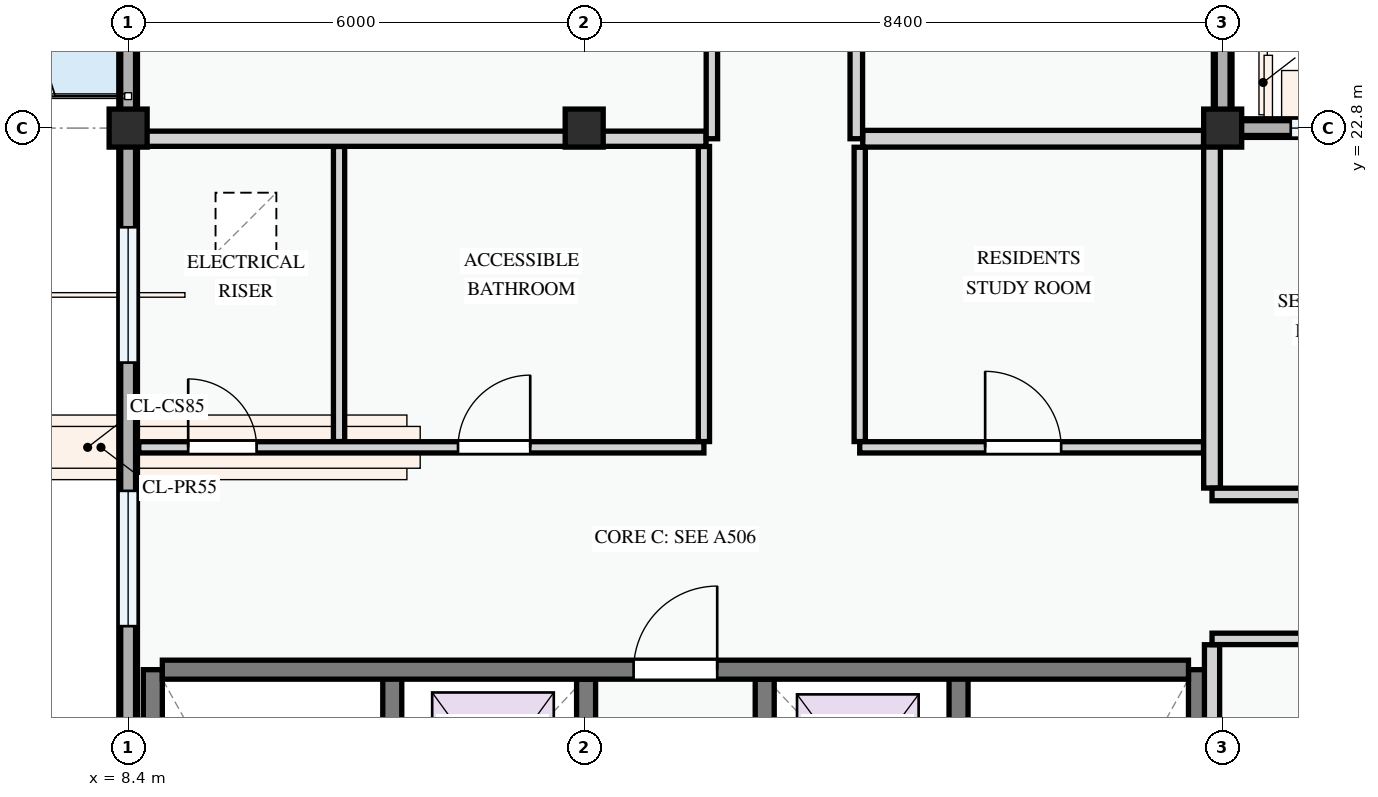
"""IFC4 building model, lengths in metres.
Left out: names, types, materials, properties, quantities, classifications, styles, units other than length and angle.
Written with IfcOpenShell. Run it as: python <this file> out.ifc"""

import sys

from ifc_helpers import new_model, si_unit, direction, frame, frame_2d, origin, origin_2d, place, context, subcontext, project, spatial, polyline, rectangle, outline, extrude, element, fill, save


model = new_model("IFC4")
c1 = context("Model", 3, precision=1e-05, world=origin(), true_north=direction((0.0, 1.0)))
c2 = subcontext(c1, "Body", "Model", "MODEL_VIEW")
j1 = project(units=[si_unit("LENGTHUNIT", "METRE"), si_unit("PLANEANGLEUNIT", "RADIAN")], contexts=[c1])
p1 = place(None, origin())
s1 = spatial("IfcSite", under=j1, at=p1, CompositionType="ELEMENT")
p2 = place(p1, origin())
s2 = spatial("IfcBuilding", under=s1, at=p2, CompositionType="ELEMENT")
p3 = place(p2, frame((0.0, 0.0, 34.5)))
s3 = spatial("IfcBuildingStorey", under=s2, at=p3, CompositionType="ELEMENT", Elevation=34.5)
for number, where, z_axis, x_axis in (
    (1, (8.4, 22.8, 0.0), (0.0, 0.0, 1.0), (1.0, 0.0, 0.0)),
    (2, (14.4, 22.8, 0.0), (0.0, 0.0, 1.0), (1.0, 0.0, 0.0)),
    (3, (22.8, 22.8, 0.0), (0.0, 0.0, 1.0), (1.0, 0.0, 0.0)),
):
    element("IfcColumn", number, at=place(p3, frame(where, z_axis=z_axis, x_axis=x_axis)), inside=s3, PredefinedType="COLUMN", context=c2, shape_type="SweptSolid", body=[
        extrude(rectangle(XDim=0.5, YDim=0.5, at=origin_2d()), origin(), (0.0, 0.0, 1.0), 3.3),
    ])
p4 = place(p3, frame((22.8, 22.8, 0.0), z_axis=(0.0, 0.0, 1.0), x_axis=(0.0, 1.0, 0.0)))
e4 = element("IfcWall", 4, at=p4, inside=s3, PredefinedType="STANDARD", context=c2, shape_type="SweptSolid", body=[
    extrude(rectangle(XDim=6.0, YDim=0.245, at=frame_2d((3.0, 0.0))), origin(), (0.0, 0.0, 1.0), 2.575),
])
p5 = place(p4, frame((1.285, 0.0, 0.78)))
e5 = element("IfcOpeningElement", 5, at=p5, cuts=e4, PredefinedType="OPENING", context=c2, shape_type="SweptSolid", body=[
    extrude(rectangle(XDim=1.3, YDim=1.4, at=frame_2d((0.65, 0.7))), frame((0.0, 0.133, 0.0), z_axis=(0.0, -1.0, 0.0), x_axis=(1.0, 0.0, 0.0)), (0.0, 0.0, 1.0), 0.265),
])
p6 = place(p4, frame((4.271, 0.0, 0.78)))
e6 = element("IfcOpeningElement", 6, at=p6, cuts=e4, PredefinedType="OPENING", context=c2, shape_type="SweptSolid", body=[
    extrude(rectangle(XDim=0.95, YDim=1.15, at=frame_2d((0.475, 0.575))), frame((0.0, 0.133, 0.0), z_axis=(0.0, -1.0, 0.0), x_axis=(1.0, 0.0, 0.0)), (0.0, 0.0, 1.0), 0.265),
])
p7 = place(p3, frame((8.4, 28.8, 0.0), z_axis=(0.0, 0.0, 1.0), x_axis=(0.0, -1.0, 0.0)))
e7 = element("IfcWall", 7, at=p7, inside=s3, PredefinedType="STANDARD", context=c2, shape_type="SweptSolid", body=[
    extrude(rectangle(XDim=6.0, YDim=0.245, at=frame_2d((3.0, 0.0))), origin(), (0.0, 0.0, 1.0), 2.445),
])
p8 = place(p7, frame((3.135, 0.0, 0.0)))
e8 = element("IfcOpeningElement", 8, at=p8, cuts=e7, PredefinedType="OPENING", context=c2, shape_type="SweptSolid", body=[
    extrude(rectangle(XDim=1.6, YDim=2.2, at=frame_2d((0.8, 1.1))), frame((0.0, 0.133, 0.0), z_axis=(0.0, -1.0, 0.0), x_axis=(1.0, 0.0, 0.0)), (0.0, 0.0, 1.0), 0.265),
])
p9 = place(p7, frame((0.7, 0.0, 0.78)))
e9 = element("IfcOpeningElement", 9, at=p9, cuts=e7, PredefinedType="OPENING", context=c2, shape_type="SweptSolid", body=[
    extrude(rectangle(XDim=0.95, YDim=1.15, at=frame_2d((0.475, 0.575))), frame((0.0, 0.133, 0.0), z_axis=(0.0, -1.0, 0.0), x_axis=(1.0, 0.0, 0.0)), (0.0, 0.0, 1.0), 0.265),
])
p10 = place(p3, frame((8.4, 22.8, 0.0), z_axis=(0.0, 0.0, 1.0), x_axis=(0.0, -1.0, 0.0)))
e10 = element("IfcWall", 10, at=p10, inside=s3, PredefinedType="STANDARD", context=c2, shape_type="SweptSolid", body=[
    extrude(rectangle(XDim=8.4, YDim=0.245, at=frame_2d((4.2, 0.0))), origin(), (0.0, 0.0, 1.0), 2.345),
])
p11 = place(p10, frame((1.305, 0.0, 0.78)))
e11 = element("IfcOpeningElement", 11, at=p11, cuts=e10, PredefinedType="OPENING", context=c2, shape_type="SweptSolid", body=[
    extrude(rectangle(XDim=1.78, YDim=1.42, at=frame_2d((0.89, 0.71))), frame((0.0, 0.133, 0.0), z_axis=(0.0, -1.0, 0.0), x_axis=(1.0, 0.0, 0.0)), (0.0, 0.0, 1.0), 0.265),
])
p12 = place(p10, frame((4.772, 0.0, 0.78)))
e12 = element("IfcOpeningElement", 12, at=p12, cuts=e10, PredefinedType="OPENING", context=c2, shape_type="SweptSolid", body=[
    extrude(rectangle(XDim=1.78, YDim=1.42, at=frame_2d((0.89, 0.71))), frame((0.0, 0.133, 0.0), z_axis=(0.0, -1.0, 0.0), x_axis=(1.0, 0.0, 0.0)), (0.0, 0.0, 1.0), 0.265),
])
p13 = place(p3, frame((28.8, 22.8, 0.0), z_axis=(0.0, 0.0, 1.0), x_axis=(-1.0, 0.0, 0.0)))
e13 = element("IfcWall", 13, at=p13, inside=s3, PredefinedType="STANDARD", context=c2, shape_type="SweptSolid", body=[
    extrude(rectangle(XDim=6.0, YDim=0.245, at=frame_2d((3.0, 0.0))), origin(), (0.0, 0.0, 1.0), 2.525),
])
p14 = place(p13, frame((0.729, 0.0, 0.78)))
e14 = element("IfcOpeningElement", 14, at=p14, cuts=e13, PredefinedType="OPENING", context=c2, shape_type="SweptSolid", body=[
    extrude(rectangle(XDim=1.05, YDim=1.2, at=frame_2d((0.525, 0.6))), frame((0.0, 0.133, 0.0), z_axis=(0.0, -1.0, 0.0), x_axis=(1.0, 0.0, 0.0)), (0.0, 0.0, 1.0), 0.265),
])
p15 = place(p13, frame((3.025, 0.0, 0.78)))
e15 = element("IfcOpeningElement", 15, at=p15, cuts=e13, PredefinedType="OPENING", context=c2, shape_type="SweptSolid", body=[
    extrude(rectangle(XDim=2.08, YDim=1.52, at=frame_2d((1.04, 0.76))), frame((0.0, 0.133, 0.0), z_axis=(0.0, -1.0, 0.0), x_axis=(1.0, 0.0, 0.0)), (0.0, 0.0, 1.0), 0.265),
])
p16 = place(p3, frame((22.8, 22.8, 3.3), z_axis=(0.0, 0.0, 1.0), x_axis=(0.0, 1.0, 0.0)))
e16 = element("IfcWall", 16, at=p16, inside=s3, PredefinedType="PARAPET", context=c2, shape_type="SweptSolid", body=[
    extrude(rectangle(XDim=20.4, YDim=0.195, at=frame_2d((10.2, 0.0))), origin(), (0.0, 0.0, 1.0), 1.15),
])
p17 = place(p3, frame((8.4, 28.8, 3.3), z_axis=(0.0, 0.0, 1.0), x_axis=(0.0, -1.0, 0.0)))
e17 = element("IfcWall", 17, at=p17, inside=s3, PredefinedType="PARAPET", context=c2, shape_type="SweptSolid", body=[
    extrude(outline(polyline([(0.0, 0.0), (6.0, 0.0), (6.0, 1.12), (5.5, 1.322), (5.0, 1.484), (4.5, 1.618), (4.0, 1.717), (3.5, 1.779), (3.0, 1.8), (2.5, 1.779), (2.0, 1.717), (1.5, 1.618), (1.0, 1.484), (0.5, 1.322), (0.0, 1.12), (0.0, 0.0)])), frame((0.0, 0.098, 0.0), z_axis=(0.0, -1.0, 0.0), x_axis=(1.0, 0.0, 0.0)), (0.0, 0.0, 1.0), 0.195),
])
p18 = place(p3, frame((8.4, 22.8, 3.3), z_axis=(0.0, 0.0, 1.0), x_axis=(0.0, -1.0, 0.0)))
e18 = element("IfcWall", 18, at=p18, inside=s3, PredefinedType="PARAPET", context=c2, shape_type="SweptSolid", body=[
    extrude(outline(polyline([(0.0, 0.0), (8.4, 0.0), (8.4, 1.12), (7.7, 1.322), (7.0, 1.484), (6.3, 1.618), (5.6, 1.717), (4.9, 1.779), (4.2, 1.8), (3.5, 1.779), (2.8, 1.717), (2.1, 1.618), (1.4, 1.484), (0.7, 1.322), (0.0, 1.12), (0.0, 0.0)])), frame((0.0, 0.098, 0.0), z_axis=(0.0, -1.0, 0.0), x_axis=(1.0, 0.0, 0.0)), (0.0, 0.0, 1.0), 0.195),
])
p19 = place(p3, frame((43.2, 22.8, 3.3), z_axis=(0.0, 0.0, 1.0), x_axis=(-1.0, 0.0, 0.0)))
e19 = element("IfcWall", 19, at=p19, inside=s3, PredefinedType="PARAPET", context=c2, shape_type="SweptSolid", body=[
    extrude(rectangle(XDim=20.4, YDim=0.195, at=frame_2d((10.2, 0.0))), origin(), (0.0, 0.0, 1.0), 1.15),
])
p20 = place(p3, frame((11.875, 8.75, 0.0), z_axis=(0.0, 0.0, 1.0), x_axis=(0.0, 1.0, 0.0)))
e20 = element("IfcWall", 20, at=p20, inside=s3, PredefinedType="SHEAR", context=c2, shape_type="SweptSolid", body=[
    extrude(rectangle(XDim=6.925, YDim=0.25, at=frame_2d((3.462, 0.0))), origin(), (0.0, 0.0, 1.0), 3.0),
])
p21 = place(p20, frame((0.35, 0.0, 0.0)))
e21 = element("IfcOpeningElement", 21, at=p21, cuts=e20, PredefinedType="OPENING", context=c2, shape_type="SweptSolid", body=[
    extrude(rectangle(XDim=0.95, YDim=2.1, at=frame_2d((0.475, 1.05))), frame((0.0, 0.135, 0.0), z_axis=(0.0, -1.0, 0.0), x_axis=(1.0, 0.0, 0.0)), (0.0, 0.0, 1.0), 0.27),
])
p22 = place(p3, frame((8.725, 8.6, 0.0), z_axis=(0.0, 0.0, 1.0), x_axis=(0.0, 1.0, 0.0)))
e22 = element("IfcWall", 22, at=p22, inside=s3, PredefinedType="SHEAR", context=c2, shape_type="SweptSolid", body=[
    extrude(rectangle(XDim=7.075, YDim=0.25, at=frame_2d((3.538, 0.0))), origin(), (0.0, 0.0, 1.0), 3.0),
])
p23 = place(p3, frame((22.475, 8.75, 0.0), z_axis=(0.0, 0.0, 1.0), x_axis=(0.0, 1.0, 0.0)))
e23 = element("IfcWall", 23, at=p23, inside=s3, PredefinedType="SHEAR", context=c2, shape_type="SweptSolid", body=[
    extrude(rectangle(XDim=6.925, YDim=0.25, at=frame_2d((3.462, 0.0))), origin(), (0.0, 0.0, 1.0), 3.0),
])
p24 = place(p3, frame((19.325, 8.75, 0.0), z_axis=(0.0, 0.0, 1.0), x_axis=(0.0, 1.0, 0.0)))
e24 = element("IfcWall", 24, at=p24, inside=s3, PredefinedType="SHEAR", context=c2, shape_type="SweptSolid", body=[
    extrude(rectangle(XDim=6.925, YDim=0.25, at=frame_2d((3.462, 0.0))), origin(), (0.0, 0.0, 1.0), 3.0),
])
p25 = place(p24, frame((0.35, 0.0, 0.0)))
e25 = element("IfcOpeningElement", 25, at=p25, cuts=e24, PredefinedType="OPENING", context=c2, shape_type="SweptSolid", body=[
    extrude(rectangle(XDim=0.95, YDim=2.1, at=frame_2d((0.475, 1.05))), frame((0.0, 0.135, 0.0), z_axis=(0.0, -1.0, 0.0), x_axis=(1.0, 0.0, 0.0)), (0.0, 0.0, 1.0), 0.27),
])
for number, where, z_axis, x_axis in (
    (26, (14.425, 13.125, 0.0), (0.0, 0.0, 1.0), (0.0, 1.0, 0.0)),
    (27, (16.775, 13.125, 0.0), (0.0, 0.0, 1.0), (0.0, 1.0, 0.0)),
):
    element("IfcWall", number, at=place(p3, frame(where, z_axis=z_axis, x_axis=x_axis)), inside=s3, PredefinedType="SHEAR", context=c2, shape_type="SweptSolid", body=[
        extrude(rectangle(XDim=2.425, YDim=0.25, at=frame_2d((1.212, 0.0))), origin(), (0.0, 0.0, 1.0), 3.0),
    ])
p26 = place(p3, frame((8.85, 15.675, 0.0), z_axis=(0.0, 0.0, 1.0), x_axis=(1.0, 0.0, 0.0)))
e28 = element("IfcWall", 28, at=p26, inside=s3, PredefinedType="SHEAR", context=c2, shape_type="SweptSolid", body=[
    extrude(rectangle(XDim=13.5, YDim=0.25, at=frame_2d((6.75, 0.0))), origin(), (0.0, 0.0, 1.0), 3.0),
])
p27 = place(p26, frame((6.2, 0.0, 0.0)))
e29 = element("IfcOpeningElement", 29, at=p27, cuts=e28, PredefinedType="OPENING", context=c2, shape_type="SweptSolid", body=[
    extrude(rectangle(XDim=1.1, YDim=2.15, at=frame_2d((0.55, 1.075))), frame((0.0, 0.135, 0.0), z_axis=(0.0, -1.0, 0.0), x_axis=(1.0, 0.0, 0.0)), (0.0, 0.0, 1.0), 0.27),
])
for number, where, z_axis, x_axis in (
    (30, (11.175, 18.676, 0.0), (0.0, 0.0, 1.0), (0.0, 1.0, 0.0)),
    (31, (15.975, 18.676, 0.0), (0.0, 0.0, 1.0), (0.0, 1.0, 0.0)),
):
    element("IfcWall", number, at=place(p3, frame(where, z_axis=z_axis, x_axis=x_axis)), inside=s3, PredefinedType="PARTITIONING", context=c2, shape_type="SweptSolid", body=[
        extrude(rectangle(XDim=3.882, YDim=0.148, at=frame_2d((1.941, 0.0))), origin(), (0.0, 0.0, 1.0), 3.0),
    ])
p28 = place(p3, frame((18.025, 18.676, 0.0), z_axis=(0.0, 0.0, 1.0), x_axis=(0.0, 1.0, 0.0)))
e32 = element("IfcWall", 32, at=p28, inside=s3, PredefinedType="PARTITIONING", context=c2, shape_type="SweptSolid", body=[
    extrude(rectangle(XDim=3.872, YDim=0.148, at=frame_2d((1.936, 0.0))), origin(), (0.0, 0.0, 1.0), 3.0),
])
p29 = place(p3, frame((8.54, 18.6, 0.0), z_axis=(0.0, 0.0, 1.0), x_axis=(1.0, 0.0, 0.0)))
e33 = element("IfcWall", 33, at=p29, inside=s3, PredefinedType="PARTITIONING", context=c2, shape_type="SweptSolid", body=[
    extrude(rectangle(XDim=7.435, YDim=0.148, at=frame_2d((3.718, 0.0))), origin(), (0.0, 0.0, 1.0), 3.0),
])
p30 = place(p29, frame((0.65, 0.0, 0.0)))
e34 = element("IfcOpeningElement", 34, at=p30, cuts=e33, PredefinedType="OPENING", context=c2, shape_type="SweptSolid", body=[
    extrude(rectangle(XDim=0.9, YDim=2.1, at=frame_2d((0.45, 1.05))), frame((0.0, 0.084, 0.0), z_axis=(0.0, -1.0, 0.0), x_axis=(1.0, 0.0, 0.0)), (0.0, 0.0, 1.0), 0.168),
])
p31 = place(p29, frame((4.2, 0.0, 0.0)))
e35 = element("IfcOpeningElement", 35, at=p31, cuts=e33, PredefinedType="OPENING", context=c2, shape_type="SweptSolid", body=[
    extrude(rectangle(XDim=0.95, YDim=2.1, at=frame_2d((0.475, 1.05))), frame((0.0, 0.084, 0.0), z_axis=(0.0, -1.0, 0.0), x_axis=(1.0, 0.0, 0.0)), (0.0, 0.0, 1.0), 0.168),
])
p32 = place(p3, frame((18.025, 18.6, 0.0), z_axis=(0.0, 0.0, 1.0), x_axis=(1.0, 0.0, 0.0)))
e36 = element("IfcWall", 36, at=p32, inside=s3, PredefinedType="PARTITIONING", context=c2, shape_type="SweptSolid", body=[
    extrude(rectangle(XDim=4.523, YDim=0.148, at=frame_2d((2.262, 0.0))), origin(), (0.0, 0.0, 1.0), 3.0),
])
p33 = place(p32, frame((1.65, 0.0, 0.0)))
e37 = element("IfcOpeningElement", 37, at=p33, cuts=e36, PredefinedType="OPENING", context=c2, shape_type="SweptSolid", body=[
    extrude(rectangle(XDim=1.0, YDim=2.15, at=frame_2d((0.5, 1.075))), frame((0.0, 0.084, 0.0), z_axis=(0.0, -1.0, 0.0), x_axis=(1.0, 0.0, 0.0)), (0.0, 0.0, 1.0), 0.168),
])
p34 = place(p3, frame((8.524, 22.66, 0.0), z_axis=(0.0, 0.0, 1.0), x_axis=(1.0, 0.0, 0.0)))
e38 = element("IfcWall", 38, at=p34, inside=s3, PredefinedType="PARTITIONING", context=c2, shape_type="SweptSolid", body=[
    extrude(rectangle(XDim=7.479, YDim=0.2, at=frame_2d((3.739, 0.0))), origin(), (0.0, 0.0, 1.0), 2.375),
])
p35 = place(p3, frame((18.064, 22.66, 0.0), z_axis=(0.0, 0.0, 1.0), x_axis=(1.0, 0.0, 0.0)))
e39 = element("IfcWall", 39, at=p35, inside=s3, PredefinedType="PARTITIONING", context=c2, shape_type="SweptSolid", body=[
    extrude(rectangle(XDim=4.484, YDim=0.22, at=frame_2d((2.242, 0.0))), origin(), (0.0, 0.0, 1.0), 2.375),
])
p36 = place(p3, frame((16.08, 22.66, 0.0), z_axis=(0.0, 0.0, 1.0), x_axis=(0.0, 1.0, 0.0)))
e40 = element("IfcWall", 40, at=p36, inside=s3, PredefinedType="PARTITIONING", context=c2, shape_type="SweptSolid", body=[
    extrude(rectangle(XDim=20.416, YDim=0.15, at=frame_2d((10.208, 0.0))), origin(), (0.0, 0.0, 1.0), 3.0),
])
p37 = place(p36, frame((2.691, 0.0, 0.0)))
e41 = element("IfcOpeningElement", 41, at=p37, cuts=e40, PredefinedType="OPENING", context=c2, shape_type="SweptSolid", body=[
    extrude(rectangle(XDim=0.92, YDim=2.1, at=frame_2d((0.46, 1.05))), frame((0.0, 0.085, 0.0), z_axis=(0.0, -1.0, 0.0), x_axis=(1.0, 0.0, 0.0)), (0.0, 0.0, 1.0), 0.17),
])
p38 = place(p36, frame((9.91, 0.0, 0.0)))
e42 = element("IfcOpeningElement", 42, at=p38, cuts=e40, PredefinedType="OPENING", context=c2, shape_type="SweptSolid", body=[
    extrude(rectangle(XDim=0.92, YDim=2.1, at=frame_2d((0.46, 1.05))), frame((0.0, 0.085, 0.0), z_axis=(0.0, -1.0, 0.0), x_axis=(1.0, 0.0, 0.0)), (0.0, 0.0, 1.0), 0.17),
])
p39 = place(p3, frame((17.98, 22.66, 0.0), z_axis=(0.0, 0.0, 1.0), x_axis=(0.0, 1.0, 0.0)))
e43 = element("IfcWall", 43, at=p39, inside=s3, PredefinedType="PARTITIONING", context=c2, shape_type="SweptSolid", body=[
    extrude(rectangle(XDim=20.416, YDim=0.165, at=frame_2d((10.208, 0.0))), origin(), (0.0, 0.0, 1.0), 3.0),
])
p40 = place(p39, frame((2.611, 0.0, 0.0)))
e44 = element("IfcOpeningElement", 44, at=p40, cuts=e43, PredefinedType="OPENING", context=c2, shape_type="SweptSolid", body=[
    extrude(rectangle(XDim=0.92, YDim=2.1, at=frame_2d((0.46, 1.05))), frame((0.0, 0.093, 0.0), z_axis=(0.0, -1.0, 0.0), x_axis=(1.0, 0.0, 0.0)), (0.0, 0.0, 1.0), 0.185),
])
p41 = place(p39, frame((9.885, 0.0, 0.0)))
e45 = element("IfcOpeningElement", 45, at=p41, cuts=e43, PredefinedType="OPENING", context=c2, shape_type="SweptSolid", body=[
    extrude(rectangle(XDim=0.92, YDim=2.1, at=frame_2d((0.46, 1.05))), frame((0.0, 0.093, 0.0), z_axis=(0.0, -1.0, 0.0), x_axis=(1.0, 0.0, 0.0)), (0.0, 0.0, 1.0), 0.185),
])
p42 = place(p3, frame((22.66, 8.524, 0.0), z_axis=(0.0, 0.0, 1.0), x_axis=(0.0, 1.0, 0.0)))
e46 = element("IfcWall", 46, at=p42, inside=s3, PredefinedType="PARTITIONING", context=c2, shape_type="SweptSolid", body=[
    extrude(rectangle(XDim=7.479, YDim=0.2, at=frame_2d((3.739, 0.0))), origin(), (0.0, 0.0, 1.0), 2.425),
])
p43 = place(p3, frame((22.66, 18.064, 0.0), z_axis=(0.0, 0.0, 1.0), x_axis=(0.0, 1.0, 0.0)))
e47 = element("IfcWall", 47, at=p43, inside=s3, PredefinedType="PARTITIONING", context=c2, shape_type="SweptSolid", body=[
    extrude(rectangle(XDim=4.676, YDim=0.22, at=frame_2d((2.338, 0.0))), origin(), (0.0, 0.0, 1.0), 2.425),
])
p44 = place(p3, frame((22.66, 16.08, 0.0), z_axis=(0.0, 0.0, 1.0), x_axis=(1.0, 0.0, 0.0)))
e48 = element("IfcWall", 48, at=p44, inside=s3, PredefinedType="PARTITIONING", context=c2, shape_type="SweptSolid", body=[
    extrude(rectangle(XDim=20.416, YDim=0.15, at=frame_2d((10.208, 0.0))), origin(), (0.0, 0.0, 1.0), 3.0),
])
p45 = place(p44, frame((2.691, 0.0, 0.0)))
e49 = element("IfcOpeningElement", 49, at=p45, cuts=e48, PredefinedType="OPENING", context=c2, shape_type="SweptSolid", body=[
    extrude(rectangle(XDim=0.92, YDim=2.1, at=frame_2d((0.46, 1.05))), frame((0.0, 0.085, 0.0), z_axis=(0.0, -1.0, 0.0), x_axis=(1.0, 0.0, 0.0)), (0.0, 0.0, 1.0), 0.17),
])
p46 = place(p44, frame((9.91, 0.0, 0.0)))
e50 = element("IfcOpeningElement", 50, at=p46, cuts=e48, PredefinedType="OPENING", context=c2, shape_type="SweptSolid", body=[
    extrude(rectangle(XDim=0.92, YDim=2.1, at=frame_2d((0.46, 1.05))), frame((0.0, 0.085, 0.0), z_axis=(0.0, -1.0, 0.0), x_axis=(1.0, 0.0, 0.0)), (0.0, 0.0, 1.0), 0.17),
])
p47 = place(p3, frame((22.66, 17.98, 0.0), z_axis=(0.0, 0.0, 1.0), x_axis=(1.0, 0.0, 0.0)))
e51 = element("IfcWall", 51, at=p47, inside=s3, PredefinedType="PARTITIONING", context=c2, shape_type="SweptSolid", body=[
    extrude(rectangle(XDim=20.416, YDim=0.165, at=frame_2d((10.208, 0.0))), origin(), (0.0, 0.0, 1.0), 3.0),
])
p48 = place(p47, frame((2.611, 0.0, 0.0)))
e52 = element("IfcOpeningElement", 52, at=p48, cuts=e51, PredefinedType="OPENING", context=c2, shape_type="SweptSolid", body=[
    extrude(rectangle(XDim=0.92, YDim=2.1, at=frame_2d((0.46, 1.05))), frame((0.0, 0.093, 0.0), z_axis=(0.0, -1.0, 0.0), x_axis=(1.0, 0.0, 0.0)), (0.0, 0.0, 1.0), 0.185),
])
p49 = place(p47, frame((9.885, 0.0, 0.0)))
e53 = element("IfcOpeningElement", 53, at=p49, cuts=e51, PredefinedType="OPENING", context=c2, shape_type="SweptSolid", body=[
    extrude(rectangle(XDim=0.96, YDim=2.12, at=frame_2d((0.48, 1.06))), frame((0.0, 0.093, 0.0), z_axis=(0.0, -1.0, 0.0), x_axis=(1.0, 0.0, 0.0)), (0.0, 0.0, 1.0), 0.185),
])
p50 = place(p11, origin())
e54 = element("IfcWindow", 54, at=p50, inside=s3, PartitioningType="DOUBLE_PANEL_VERTICAL", PredefinedType="WINDOW", context=c2, shape_type="SweptSolid", body=[
    extrude(rectangle(XDim=1.78, YDim=1.42, at=frame_2d((0.89, 0.71))), frame((0.0, 0.03, 0.0), z_axis=(0.0, -1.0, 0.0), x_axis=(1.0, 0.0, 0.0)), (0.0, 0.0, 1.0), 0.06),
])
fill(e11, e54)
p51 = place(p12, origin())
e55 = element("IfcWindow", 55, at=p51, inside=s3, PartitioningType="DOUBLE_PANEL_VERTICAL", PredefinedType="WINDOW", context=c2, shape_type="SweptSolid", body=[
    extrude(rectangle(XDim=1.78, YDim=1.42, at=frame_2d((0.89, 0.71))), frame((0.0, 0.03, 0.0), z_axis=(0.0, -1.0, 0.0), x_axis=(1.0, 0.0, 0.0)), (0.0, 0.0, 1.0), 0.06),
])
fill(e12, e55)
p52 = place(p15, origin())
e56 = element("IfcWindow", 56, at=p52, inside=s3, PartitioningType="DOUBLE_PANEL_VERTICAL", PredefinedType="WINDOW", context=c2, shape_type="SweptSolid", body=[
    extrude(rectangle(XDim=2.08, YDim=1.52, at=frame_2d((1.04, 0.76))), frame((0.0, 0.03, 0.0), z_axis=(0.0, -1.0, 0.0), x_axis=(1.0, 0.0, 0.0)), (0.0, 0.0, 1.0), 0.06),
])
fill(e15, e56)
p53 = place(p27, origin())
e57 = element("IfcDoor", 57, at=p53, inside=s3, OperationType="SINGLE_SWING_RIGHT", PredefinedType="DOOR", context=c2, shape_type="SweptSolid", body=[
    extrude(rectangle(XDim=1.1, YDim=2.15, at=frame_2d((0.55, 1.075))), frame((0.0, 0.025, 0.0), z_axis=(0.0, -1.0, 0.0), x_axis=(1.0, 0.0, 0.0)), (0.0, 0.0, 1.0), 0.05),
])
fill(e29, e57)
p54 = place(p30, origin())
e58 = element("IfcDoor", 58, at=p54, inside=s3, OperationType="SINGLE_SWING_LEFT", PredefinedType="DOOR", context=c2, shape_type="SweptSolid", body=[
    extrude(rectangle(XDim=0.9, YDim=2.1, at=frame_2d((0.45, 1.05))), frame((0.0, 0.025, 0.0), z_axis=(0.0, -1.0, 0.0), x_axis=(1.0, 0.0, 0.0)), (0.0, 0.0, 1.0), 0.05),
])
fill(e34, e58)
p55 = place(p31, origin())
e59 = element("IfcDoor", 59, at=p55, inside=s3, OperationType="SINGLE_SWING_RIGHT", PredefinedType="DOOR", context=c2, shape_type="SweptSolid", body=[
    extrude(rectangle(XDim=0.95, YDim=2.1, at=frame_2d((0.475, 1.05))), frame((0.0, 0.025, 0.0), z_axis=(0.0, -1.0, 0.0), x_axis=(1.0, 0.0, 0.0)), (0.0, 0.0, 1.0), 0.05),
])
fill(e35, e59)
p56 = place(p33, origin())
e60 = element("IfcDoor", 60, at=p56, inside=s3, OperationType="SINGLE_SWING_LEFT", PredefinedType="DOOR", context=c2, shape_type="SweptSolid", body=[
    extrude(rectangle(XDim=1.0, YDim=2.15, at=frame_2d((0.5, 1.075))), frame((0.0, 0.025, 0.0), z_axis=(0.0, -1.0, 0.0), x_axis=(1.0, 0.0, 0.0)), (0.0, 0.0, 1.0), 0.05),
])
fill(e37, e60)
save(model, sys.argv[1])
